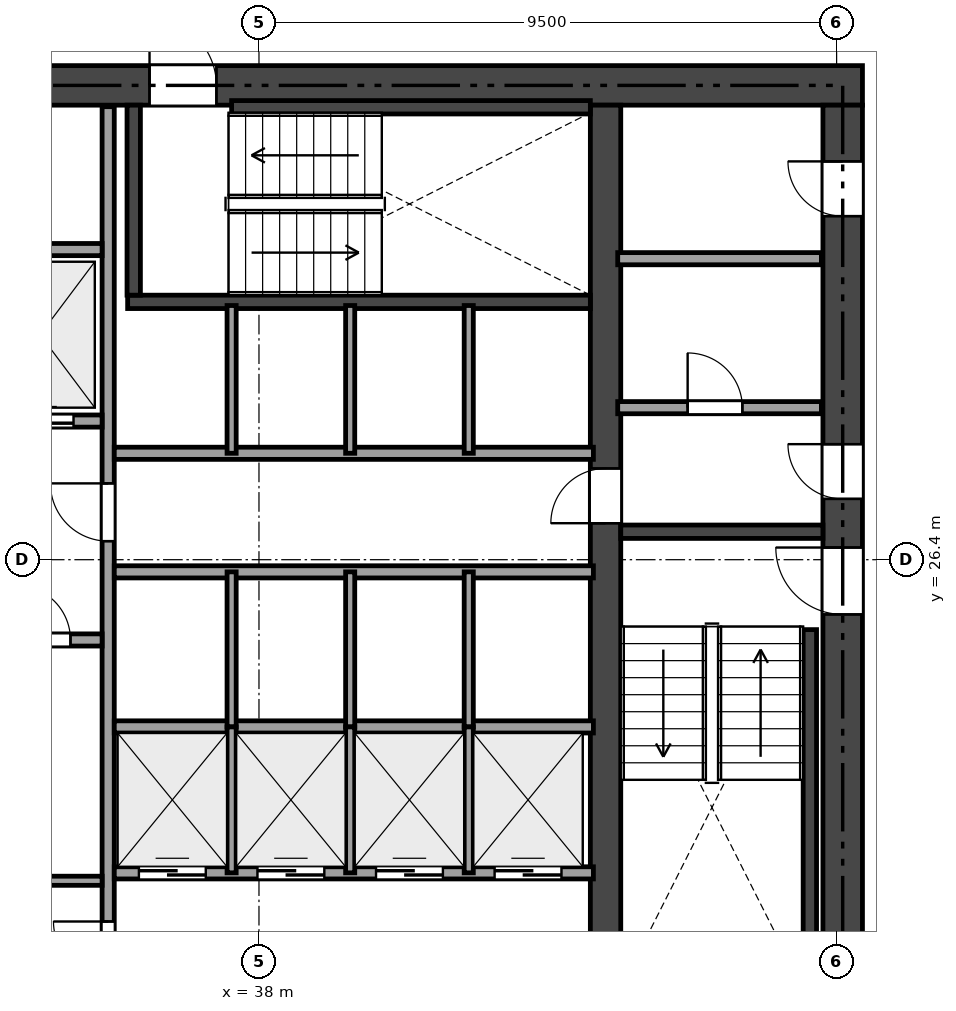
"""IFC4 building model, lengths in metres.
Left out: names, types, materials, properties, quantities, classifications, styles, units other than length and angle.
Written with IfcOpenShell. Run it as: python <this file> out.ifc"""

import sys

from ifc_helpers import new_model, si_unit, direction, frame, frame_2d, origin, place, context, subcontext, project, spatial, rectangle, extrude, element, fill, save


model = new_model("IFC4")
c1 = context("Model", 3, precision=1e-05, world=origin(), true_north=direction((0.0, 1.0)))
c2 = subcontext(c1, "Body", "Model", "MODEL_VIEW")
j1 = project(units=[si_unit("LENGTHUNIT", "METRE"), si_unit("PLANEANGLEUNIT", "RADIAN")], contexts=[c1])
p1 = place(None, origin())
s1 = spatial("IfcSite", under=j1, at=p1, CompositionType="ELEMENT")
p2 = place(p1, origin())
s2 = spatial("IfcBuilding", under=s1, at=p2, CompositionType="ELEMENT")
p3 = place(p2, frame((0.0, 0.0, 40.8)))
s3 = spatial("IfcBuildingStorey", under=s2, at=p3, CompositionType="ELEMENT", Elevation=40.8)
p4 = place(p3, frame((26.475, 34.2, 0.0), z_axis=(0.0, 0.0, 1.0), x_axis=(1.0, 0.0, 0.0)))
e1 = element("IfcWall", 1, at=p4, inside=s3, PredefinedType="SHEAR", context=c2, shape_type="SweptSolid", body=[
    extrude(rectangle(XDim=21.45, YDim=0.65, at=frame_2d((10.725, 0.0))), origin(), (0.0, 0.0, 1.0), 3.17),
])
p5 = place(p4, frame((9.725, 0.0, 0.0)))
e2 = element("IfcOpeningElement", 2, at=p5, cuts=e1, PredefinedType="OPENING", context=c2, shape_type="SweptSolid", body=[
    extrude(rectangle(XDim=1.1, YDim=2.15, at=frame_2d((0.55, 1.075))), frame((0.0, 0.335, 0.0), z_axis=(0.0, -1.0, 0.0), x_axis=(1.0, 0.0, 0.0)), (0.0, 0.0, 1.0), 0.67),
])
p6 = place(p4, frame((1.975, 0.0, 0.0)))
e3 = element("IfcOpeningElement", 3, at=p6, cuts=e1, PredefinedType="OPENING", context=c2, shape_type="SweptSolid", body=[
    extrude(rectangle(XDim=0.9, YDim=2.1, at=frame_2d((0.45, 1.05))), frame((0.0, 0.335, 0.0), z_axis=(0.0, -1.0, 0.0), x_axis=(1.0, 0.0, 0.0)), (0.0, 0.0, 1.0), 0.67),
])
p7 = place(p4, frame((6.275, 0.0, 0.0)))
e4 = element("IfcOpeningElement", 4, at=p7, cuts=e1, PredefinedType="OPENING", context=c2, shape_type="SweptSolid", body=[
    extrude(rectangle(XDim=0.9, YDim=2.1, at=frame_2d((0.45, 1.05))), frame((0.0, 0.335, 0.0), z_axis=(0.0, -1.0, 0.0), x_axis=(1.0, 0.0, 0.0)), (0.0, 0.0, 1.0), 0.67),
])
p8 = place(p3, frame((47.6, 18.925, 0.0), z_axis=(0.0, 0.0, 1.0), x_axis=(0.0, 1.0, 0.0)))
e5 = element("IfcWall", 5, at=p8, inside=s3, PredefinedType="SHEAR", context=c2, shape_type="SweptSolid", body=[
    extrude(rectangle(XDim=14.95, YDim=0.65, at=frame_2d((7.475, 0.0))), origin(), (0.0, 0.0, 1.0), 3.17),
])
p9 = place(p8, frame((6.575, 0.0, 0.0)))
e6 = element("IfcOpeningElement", 6, at=p9, cuts=e5, PredefinedType="OPENING", context=c2, shape_type="SweptSolid", body=[
    extrude(rectangle(XDim=1.1, YDim=2.15, at=frame_2d((0.55, 1.075))), frame((0.0, 0.335, 0.0), z_axis=(0.0, -1.0, 0.0), x_axis=(1.0, 0.0, 0.0)), (0.0, 0.0, 1.0), 0.67),
])
p10 = place(p8, frame((8.475, 0.0, 0.0)))
e7 = element("IfcOpeningElement", 7, at=p10, cuts=e5, PredefinedType="OPENING", context=c2, shape_type="SweptSolid", body=[
    extrude(rectangle(XDim=0.9, YDim=2.1, at=frame_2d((0.45, 1.05))), frame((0.0, 0.335, 0.0), z_axis=(0.0, -1.0, 0.0), x_axis=(1.0, 0.0, 0.0)), (0.0, 0.0, 1.0), 0.67),
])
p11 = place(p8, frame((13.125, 0.0, 0.0)))
e8 = element("IfcOpeningElement", 8, at=p11, cuts=e5, PredefinedType="OPENING", context=c2, shape_type="SweptSolid", body=[
    extrude(rectangle(XDim=0.9, YDim=2.1, at=frame_2d((0.45, 1.05))), frame((0.0, 0.335, 0.0), z_axis=(0.0, -1.0, 0.0), x_axis=(1.0, 0.0, 0.0)), (0.0, 0.0, 1.0), 0.67),
])
p12 = place(p3, frame((43.7, 18.925, 0.0), z_axis=(0.0, 0.0, 1.0), x_axis=(0.0, 1.0, 0.0)))
e9 = element("IfcWall", 9, at=p12, inside=s3, PredefinedType="SHEAR", context=c2, shape_type="SweptSolid", body=[
    extrude(rectangle(XDim=14.95, YDim=0.5, at=frame_2d((7.475, 0.0))), origin(), (0.0, 0.0, 1.0), 3.17),
])
p13 = place(p12, frame((8.075, 0.0, 0.0)))
e10 = element("IfcOpeningElement", 10, at=p13, cuts=e9, PredefinedType="OPENING", context=c2, shape_type="SweptSolid", body=[
    extrude(rectangle(XDim=0.9, YDim=2.1, at=frame_2d((0.45, 1.05))), frame((0.0, 0.26, 0.0), z_axis=(0.0, -1.0, 0.0), x_axis=(1.0, 0.0, 0.0)), (0.0, 0.0, 1.0), 0.52),
])
p14 = place(p3, frame((43.95, 26.86, 0.0), z_axis=(0.0, 0.0, 1.0), x_axis=(1.0, 0.0, 0.0)))
e11 = element("IfcWall", 11, at=p14, inside=s3, PredefinedType="SHEAR", context=c2, shape_type="SweptSolid", body=[
    extrude(rectangle(XDim=3.325, YDim=0.22, at=frame_2d((1.663, 0.0))), origin(), (0.0, 0.0, 1.0), 3.17),
])
p15 = place(p3, frame((47.06, 19.35, 0.0), z_axis=(0.0, 0.0, 1.0), x_axis=(0.0, 1.0, 0.0)))
e12 = element("IfcWall", 12, at=p15, inside=s3, PredefinedType="SHEAR", context=c2, shape_type="SweptSolid", body=[
    extrude(rectangle(XDim=5.9, YDim=0.22, at=frame_2d((2.95, 0.0))), origin(), (0.0, 0.0, 1.0), 3.17),
])
p16 = place(p3, frame((35.84, 30.64, 0.0), z_axis=(0.0, 0.0, 1.0), x_axis=(1.0, 0.0, 0.0)))
e13 = element("IfcWall", 13, at=p16, inside=s3, PredefinedType="SHEAR", context=c2, shape_type="SweptSolid", body=[
    extrude(rectangle(XDim=7.61, YDim=0.22, at=frame_2d((3.805, 0.0))), origin(), (0.0, 0.0, 1.0), 3.17),
])
p17 = place(p3, frame((35.94, 30.75, 0.0), z_axis=(0.0, 0.0, 1.0), x_axis=(0.0, 1.0, 0.0)))
e14 = element("IfcWall", 14, at=p17, inside=s3, PredefinedType="SHEAR", context=c2, shape_type="SweptSolid", body=[
    extrude(rectangle(XDim=3.125, YDim=0.22, at=frame_2d((1.562, 0.0))), origin(), (0.0, 0.0, 1.0), 3.17),
])
p18 = place(p3, frame((37.55, 33.84, 0.0), z_axis=(0.0, 0.0, 1.0), x_axis=(1.0, 0.0, 0.0)))
e15 = element("IfcWall", 15, at=p18, inside=s3, PredefinedType="SHEAR", context=c2, shape_type="SweptSolid", body=[
    extrude(rectangle(XDim=5.9, YDim=0.22, at=frame_2d((2.95, 0.0))), origin(), (0.0, 0.0, 1.0), 3.17),
])
p19 = place(p3, frame((43.9, 28.9, 0.0), z_axis=(0.0, 0.0, 1.0), x_axis=(1.0, 0.0, 0.0)))
e16 = element("IfcWall", 16, at=p19, inside=s3, PredefinedType="SOLIDWALL", context=c2, shape_type="SweptSolid", body=[
    extrude(rectangle(XDim=3.35, YDim=0.2, at=frame_2d((1.675, 0.0))), origin(), (0.0, 0.0, 1.0), 3.17),
])
p20 = place(p19, frame((1.15, 0.0, 0.0)))
e17 = element("IfcOpeningElement", 17, at=p20, cuts=e16, PredefinedType="OPENING", context=c2, shape_type="SweptSolid", body=[
    extrude(rectangle(XDim=0.9, YDim=2.1, at=frame_2d((0.45, 1.05))), frame((0.0, 0.11, 0.0), z_axis=(0.0, -1.0, 0.0), x_axis=(1.0, 0.0, 0.0)), (0.0, 0.0, 1.0), 0.22),
])
p21 = place(p3, frame((43.9, 31.35, 0.0), z_axis=(0.0, 0.0, 1.0), x_axis=(1.0, 0.0, 0.0)))
e18 = element("IfcWall", 18, at=p21, inside=s3, PredefinedType="SOLIDWALL", context=c2, shape_type="SweptSolid", body=[
    extrude(rectangle(XDim=3.35, YDim=0.2, at=frame_2d((1.675, 0.0))), origin(), (0.0, 0.0, 1.0), 3.17),
])
p22 = place(p3, frame((35.52, 18.95, 0.0), z_axis=(0.0, 0.0, 1.0), x_axis=(0.0, 1.0, 0.0)))
e19 = element("IfcWall", 19, at=p22, inside=s3, PredefinedType="SOLIDWALL", context=c2, shape_type="SweptSolid", body=[
    extrude(rectangle(XDim=14.9, YDim=0.2, at=frame_2d((7.45, 0.0))), origin(), (0.0, 0.0, 1.0), 2.691),
])
p23 = place(p22, frame((7.755, 0.0, 0.0)))
e20 = element("IfcOpeningElement", 20, at=p23, cuts=e19, PredefinedType="OPENING", context=c2, shape_type="SweptSolid", body=[
    extrude(rectangle(XDim=0.95, YDim=2.15, at=frame_2d((0.475, 1.075))), frame((0.0, 0.11, 0.0), z_axis=(0.0, -1.0, 0.0), x_axis=(1.0, 0.0, 0.0)), (0.0, 0.0, 1.0), 0.22),
])
p24 = place(p22, frame((0.6, 0.0, 0.0)))
e21 = element("IfcOpeningElement", 21, at=p24, cuts=e19, PredefinedType="OPENING", context=c2, shape_type="SweptSolid", body=[
    extrude(rectangle(XDim=0.9, YDim=2.1, at=frame_2d((0.45, 1.05))), frame((0.0, 0.11, 0.0), z_axis=(0.0, -1.0, 0.0), x_axis=(1.0, 0.0, 0.0)), (0.0, 0.0, 1.0), 0.22),
])
p25 = place(p3, frame((31.0, 28.68, 0.0), z_axis=(0.0, 0.0, 1.0), x_axis=(1.0, 0.0, 0.0)))
e22 = element("IfcWall", 22, at=p25, inside=s3, PredefinedType="SOLIDWALL", context=c2, shape_type="SweptSolid", body=[
    extrude(rectangle(XDim=4.42, YDim=0.2, at=frame_2d((2.21, 0.0))), origin(), (0.0, 0.0, 1.0), 3.17),
])
p26 = place(p25, frame((0.6, 0.0, 0.0)))
e23 = element("IfcOpeningElement", 23, at=p26, cuts=e22, PredefinedType="OPENING", context=c2, shape_type="SweptSolid", body=[
    extrude(rectangle(XDim=1.1, YDim=2.15, at=frame_2d((0.55, 1.075))), frame((0.0, 0.11, 0.0), z_axis=(0.0, -1.0, 0.0), x_axis=(1.0, 0.0, 0.0)), (0.0, 0.0, 1.0), 0.22),
])
p27 = place(p25, frame((2.85, 0.0, 0.0)))
e24 = element("IfcOpeningElement", 24, at=p27, cuts=e22, PredefinedType="OPENING", context=c2, shape_type="SweptSolid", body=[
    extrude(rectangle(XDim=1.1, YDim=2.15, at=frame_2d((0.55, 1.075))), frame((0.0, 0.11, 0.0), z_axis=(0.0, -1.0, 0.0), x_axis=(1.0, 0.0, 0.0)), (0.0, 0.0, 1.0), 0.22),
])
p28 = place(p3, frame((31.0, 31.5, 0.0), z_axis=(0.0, 0.0, 1.0), x_axis=(1.0, 0.0, 0.0)))
e25 = element("IfcWall", 25, at=p28, inside=s3, PredefinedType="SOLIDWALL", context=c2, shape_type="SweptSolid", body=[
    extrude(rectangle(XDim=4.42, YDim=0.2, at=frame_2d((2.21, 0.0))), origin(), (0.0, 0.0, 1.0), 3.17),
])
p29 = place(p3, frame((31.0, 25.08, 0.0), z_axis=(0.0, 0.0, 1.0), x_axis=(1.0, 0.0, 0.0)))
e26 = element("IfcWall", 26, at=p29, inside=s3, PredefinedType="SOLIDWALL", context=c2, shape_type="SweptSolid", body=[
    extrude(rectangle(XDim=4.42, YDim=0.2, at=frame_2d((2.21, 0.0))), origin(), (0.0, 0.0, 1.0), 3.17),
])
p30 = place(p29, frame((3.0, 0.0, 0.0)))
e27 = element("IfcOpeningElement", 27, at=p30, cuts=e26, PredefinedType="OPENING", context=c2, shape_type="SweptSolid", body=[
    extrude(rectangle(XDim=0.9, YDim=2.1, at=frame_2d((0.45, 1.05))), frame((0.0, 0.11, 0.0), z_axis=(0.0, -1.0, 0.0), x_axis=(1.0, 0.0, 0.0)), (0.0, 0.0, 1.0), 0.22),
])
p31 = place(p29, frame((0.62, 0.0, 0.0)))
e28 = element("IfcOpeningElement", 28, at=p31, cuts=e26, PredefinedType="OPENING", context=c2, shape_type="SweptSolid", body=[
    extrude(rectangle(XDim=1.2, YDim=2.15, at=frame_2d((0.6, 1.075))), frame((0.0, 0.11, 0.0), z_axis=(0.0, -1.0, 0.0), x_axis=(1.0, 0.0, 0.0)), (0.0, 0.0, 1.0), 0.22),
])
p32 = place(p3, frame((33.42, 21.12, 0.0), z_axis=(0.0, 0.0, 1.0), x_axis=(1.0, 0.0, 0.0)))
e29 = element("IfcWall", 29, at=p32, inside=s3, PredefinedType="PARTITIONING", context=c2, shape_type="SweptSolid", body=[
    extrude(rectangle(XDim=2.0, YDim=0.15, at=frame_2d((1.0, 0.0))), origin(), (0.0, 0.0, 1.0), 3.17),
])
for number, where, z_axis, x_axis in (
    (30, (35.62, 28.15, 0.0), (0.0, 0.0, 1.0), (1.0, 0.0, 0.0)),
    (31, (35.62, 26.2, 0.0), (0.0, 0.0, 1.0), (1.0, 0.0, 0.0)),
):
    element("IfcWall", number, at=place(p3, frame(where, z_axis=z_axis, x_axis=x_axis)), inside=s3, PredefinedType="SOLIDWALL", context=c2, shape_type="SweptSolid", body=[
        extrude(rectangle(XDim=7.88, YDim=0.2, at=frame_2d((3.94, 0.0))), origin(), (0.0, 0.0, 1.0), 3.17),
    ])
p33 = place(p3, frame((35.62, 23.65, 0.0), z_axis=(0.0, 0.0, 1.0), x_axis=(1.0, 0.0, 0.0)))
e32 = element("IfcWall", 32, at=p33, inside=s3, PredefinedType="SOLIDWALL", context=c2, shape_type="SweptSolid", body=[
    extrude(rectangle(XDim=7.88, YDim=0.2, at=frame_2d((3.94, 0.0))), origin(), (0.0, 0.0, 1.0), 2.691),
])
p34 = place(p3, frame((35.62, 21.25, 0.0), z_axis=(0.0, 0.0, 1.0), x_axis=(1.0, 0.0, 0.0)))
e33 = element("IfcWall", 33, at=p34, inside=s3, PredefinedType="SOLIDWALL", context=c2, shape_type="SweptSolid", body=[
    extrude(rectangle(XDim=7.88, YDim=0.2, at=frame_2d((3.94, 0.0))), origin(), (0.0, 0.0, 1.0), 3.17),
])
p35 = place(p34, frame((0.405, 0.0, 0.0)))
e34 = element("IfcOpeningElement", 34, at=p35, cuts=e33, PredefinedType="OPENING", context=c2, shape_type="SweptSolid", body=[
    extrude(rectangle(XDim=1.1, YDim=2.15, at=frame_2d((0.55, 1.075))), frame((0.0, 0.11, 0.0), z_axis=(0.0, -1.0, 0.0), x_axis=(1.0, 0.0, 0.0)), (0.0, 0.0, 1.0), 0.22),
])
p36 = place(p34, frame((2.355, 0.0, 0.0)))
e35 = element("IfcOpeningElement", 35, at=p36, cuts=e33, PredefinedType="OPENING", context=c2, shape_type="SweptSolid", body=[
    extrude(rectangle(XDim=1.1, YDim=2.15, at=frame_2d((0.55, 1.075))), frame((0.0, 0.11, 0.0), z_axis=(0.0, -1.0, 0.0), x_axis=(1.0, 0.0, 0.0)), (0.0, 0.0, 1.0), 0.22),
])
p37 = place(p34, frame((4.305, 0.0, 0.0)))
e36 = element("IfcOpeningElement", 36, at=p37, cuts=e33, PredefinedType="OPENING", context=c2, shape_type="SweptSolid", body=[
    extrude(rectangle(XDim=1.1, YDim=2.15, at=frame_2d((0.55, 1.075))), frame((0.0, 0.11, 0.0), z_axis=(0.0, -1.0, 0.0), x_axis=(1.0, 0.0, 0.0)), (0.0, 0.0, 1.0), 0.22),
])
p38 = place(p34, frame((6.255, 0.0, 0.0)))
e37 = element("IfcOpeningElement", 37, at=p38, cuts=e33, PredefinedType="OPENING", context=c2, shape_type="SweptSolid", body=[
    extrude(rectangle(XDim=1.1, YDim=2.15, at=frame_2d((0.55, 1.075))), frame((0.0, 0.11, 0.0), z_axis=(0.0, -1.0, 0.0), x_axis=(1.0, 0.0, 0.0)), (0.0, 0.0, 1.0), 0.22),
])
for number, where, z_axis, x_axis in (
    (38, (37.55, 28.15, 0.0), (0.0, 0.0, 1.0), (0.0, 1.0, 0.0)),
    (39, (39.5, 28.15, 0.0), (0.0, 0.0, 1.0), (0.0, 1.0, 0.0)),
    (40, (41.45, 28.15, 0.0), (0.0, 0.0, 1.0), (0.0, 1.0, 0.0)),
):
    element("IfcWall", number, at=place(p3, frame(where, z_axis=z_axis, x_axis=x_axis)), inside=s3, PredefinedType="PARTITIONING", context=c2, shape_type="SweptSolid", body=[
        extrude(rectangle(XDim=2.43, YDim=0.15, at=frame_2d((1.215, 0.0))), origin(), (0.0, 0.0, 1.0), 3.17),
    ])
for number, where, z_axis, x_axis in (
    (41, (37.55, 23.65, 0.0), (0.0, 0.0, 1.0), (0.0, 1.0, 0.0)),
    (42, (39.5, 23.65, 0.0), (0.0, 0.0, 1.0), (0.0, 1.0, 0.0)),
    (43, (41.45, 23.65, 0.0), (0.0, 0.0, 1.0), (0.0, 1.0, 0.0)),
):
    element("IfcWall", number, at=place(p3, frame(where, z_axis=z_axis, x_axis=x_axis)), inside=s3, PredefinedType="PARTITIONING", context=c2, shape_type="SweptSolid", body=[
        extrude(rectangle(XDim=2.55, YDim=0.15, at=frame_2d((1.275, 0.0))), origin(), (0.0, 0.0, 1.0), 2.691),
    ])
for number, where, z_axis, x_axis in (
    (44, (37.55, 21.25, 0.0), (0.0, 0.0, 1.0), (0.0, 1.0, 0.0)),
    (45, (39.5, 21.25, 0.0), (0.0, 0.0, 1.0), (0.0, 1.0, 0.0)),
    (46, (41.45, 21.25, 0.0), (0.0, 0.0, 1.0), (0.0, 1.0, 0.0)),
):
    element("IfcWall", number, at=place(p3, frame(where, z_axis=z_axis, x_axis=x_axis)), inside=s3, PredefinedType="PARTITIONING", context=c2, shape_type="SweptSolid", body=[
        extrude(rectangle(XDim=2.4, YDim=0.15, at=frame_2d((1.2, 0.0))), origin(), (0.0, 0.0, 1.0), 2.691),
    ])
p39 = place(p9, origin())
e47 = element("IfcDoor", 47, at=p39, inside=s3, OperationType="SINGLE_SWING_RIGHT", PredefinedType="DOOR", context=c2, shape_type="SweptSolid", body=[
    extrude(rectangle(XDim=1.1, YDim=2.15, at=frame_2d((0.55, 1.075))), frame((0.0, 0.025, 0.0), z_axis=(0.0, -1.0, 0.0), x_axis=(1.0, 0.0, 0.0)), (0.0, 0.0, 1.0), 0.05),
])
fill(e6, e47)
p40 = place(p5, origin())
e48 = element("IfcDoor", 48, at=p40, inside=s3, OperationType="SINGLE_SWING_LEFT", PredefinedType="DOOR", context=c2, shape_type="SweptSolid", body=[
    extrude(rectangle(XDim=1.1, YDim=2.15, at=frame_2d((0.55, 1.075))), frame((0.0, 0.025, 0.0), z_axis=(0.0, -1.0, 0.0), x_axis=(1.0, 0.0, 0.0)), (0.0, 0.0, 1.0), 0.05),
])
fill(e2, e48)
p41 = place(p23, origin())
e49 = element("IfcDoor", 49, at=p41, inside=s3, OperationType="SINGLE_SWING_RIGHT", PredefinedType="DOOR", context=c2, shape_type="SweptSolid", body=[
    extrude(rectangle(XDim=0.95, YDim=2.15, at=frame_2d((0.475, 1.075))), frame((0.0, 0.025, 0.0), z_axis=(0.0, -1.0, 0.0), x_axis=(1.0, 0.0, 0.0)), (0.0, 0.0, 1.0), 0.05),
])
fill(e20, e49)
p42 = place(p13, origin())
e50 = element("IfcDoor", 50, at=p42, inside=s3, OperationType="SINGLE_SWING_LEFT", PredefinedType="DOOR", context=c2, shape_type="SweptSolid", body=[
    extrude(rectangle(XDim=0.9, YDim=2.1, at=frame_2d((0.45, 1.05))), frame((0.0, 0.025, 0.0), z_axis=(0.0, -1.0, 0.0), x_axis=(1.0, 0.0, 0.0)), (0.0, 0.0, 1.0), 0.05),
])
fill(e10, e50)
p43 = place(p10, origin())
e51 = element("IfcDoor", 51, at=p43, inside=s3, OperationType="SINGLE_SWING_RIGHT", PredefinedType="DOOR", context=c2, shape_type="SweptSolid", body=[
    extrude(rectangle(XDim=0.9, YDim=2.1, at=frame_2d((0.45, 1.05))), frame((0.0, 0.025, 0.0), z_axis=(0.0, -1.0, 0.0), x_axis=(1.0, 0.0, 0.0)), (0.0, 0.0, 1.0), 0.05),
])
fill(e7, e51)
p44 = place(p20, origin())
e52 = element("IfcDoor", 52, at=p44, inside=s3, OperationType="SINGLE_SWING_LEFT", PredefinedType="DOOR", context=c2, shape_type="SweptSolid", body=[
    extrude(rectangle(XDim=0.9, YDim=2.1, at=frame_2d((0.45, 1.05))), frame((0.0, 0.025, 0.0), z_axis=(0.0, -1.0, 0.0), x_axis=(1.0, 0.0, 0.0)), (0.0, 0.0, 1.0), 0.05),
])
fill(e17, e52)
p45 = place(p11, origin())
e53 = element("IfcDoor", 53, at=p45, inside=s3, OperationType="SINGLE_SWING_RIGHT", PredefinedType="DOOR", context=c2, shape_type="SweptSolid", body=[
    extrude(rectangle(XDim=0.9, YDim=2.1, at=frame_2d((0.45, 1.05))), frame((0.0, 0.025, 0.0), z_axis=(0.0, -1.0, 0.0), x_axis=(1.0, 0.0, 0.0)), (0.0, 0.0, 1.0), 0.05),
])
fill(e8, e53)
p46 = place(p24, origin())
e54 = element("IfcDoor", 54, at=p46, inside=s3, OperationType="SINGLE_SWING_RIGHT", PredefinedType="DOOR", context=c2, shape_type="SweptSolid", body=[
    extrude(rectangle(XDim=0.9, YDim=2.1, at=frame_2d((0.45, 1.05))), frame((0.0, 0.025, 0.0), z_axis=(0.0, -1.0, 0.0), x_axis=(1.0, 0.0, 0.0)), (0.0, 0.0, 1.0), 0.05),
])
fill(e21, e54)
p47 = place(p30, origin())
e55 = element("IfcDoor", 55, at=p47, inside=s3, OperationType="SINGLE_SWING_LEFT", PredefinedType="DOOR", context=c2, shape_type="SweptSolid", body=[
    extrude(rectangle(XDim=0.9, YDim=2.1, at=frame_2d((0.45, 1.05))), frame((0.0, 0.025, 0.0), z_axis=(0.0, -1.0, 0.0), x_axis=(1.0, 0.0, 0.0)), (0.0, 0.0, 1.0), 0.05),
])
fill(e27, e55)
p48 = place(p27, origin())
e56 = element("IfcDoor", 56, at=p48, inside=s3, OperationType="SLIDING_TO_LEFT", PredefinedType="DOOR", context=c2, shape_type="SweptSolid", body=[
    extrude(rectangle(XDim=1.1, YDim=2.15, at=frame_2d((0.55, 1.075))), frame((0.0, 0.025, 0.0), z_axis=(0.0, -1.0, 0.0), x_axis=(1.0, 0.0, 0.0)), (0.0, 0.0, 1.0), 0.05),
])
fill(e24, e56)
p49 = place(p35, origin())
e57 = element("IfcDoor", 57, at=p49, inside=s3, OperationType="SLIDING_TO_LEFT", PredefinedType="DOOR", context=c2, shape_type="SweptSolid", body=[
    extrude(rectangle(XDim=1.1, YDim=2.15, at=frame_2d((0.55, 1.075))), frame((0.0, 0.025, 0.0), z_axis=(0.0, -1.0, 0.0), x_axis=(1.0, 0.0, 0.0)), (0.0, 0.0, 1.0), 0.05),
])
fill(e34, e57)
p50 = place(p36, origin())
e58 = element("IfcDoor", 58, at=p50, inside=s3, OperationType="SLIDING_TO_LEFT", PredefinedType="DOOR", context=c2, shape_type="SweptSolid", body=[
    extrude(rectangle(XDim=1.1, YDim=2.15, at=frame_2d((0.55, 1.075))), frame((0.0, 0.025, 0.0), z_axis=(0.0, -1.0, 0.0), x_axis=(1.0, 0.0, 0.0)), (0.0, 0.0, 1.0), 0.05),
])
fill(e35, e58)
p51 = place(p37, origin())
e59 = element("IfcDoor", 59, at=p51, inside=s3, OperationType="SLIDING_TO_LEFT", PredefinedType="DOOR", context=c2, shape_type="SweptSolid", body=[
    extrude(rectangle(XDim=1.1, YDim=2.15, at=frame_2d((0.55, 1.075))), frame((0.0, 0.025, 0.0), z_axis=(0.0, -1.0, 0.0), x_axis=(1.0, 0.0, 0.0)), (0.0, 0.0, 1.0), 0.05),
])
fill(e36, e59)
p52 = place(p38, origin())
e60 = element("IfcDoor", 60, at=p52, inside=s3, OperationType="SLIDING_TO_LEFT", PredefinedType="DOOR", context=c2, shape_type="SweptSolid", body=[
    extrude(rectangle(XDim=1.1, YDim=2.15, at=frame_2d((0.55, 1.075))), frame((0.0, 0.025, 0.0), z_axis=(0.0, -1.0, 0.0), x_axis=(1.0, 0.0, 0.0)), (0.0, 0.0, 1.0), 0.05),
])
fill(e37, e60)
save(model, sys.argv[1])
